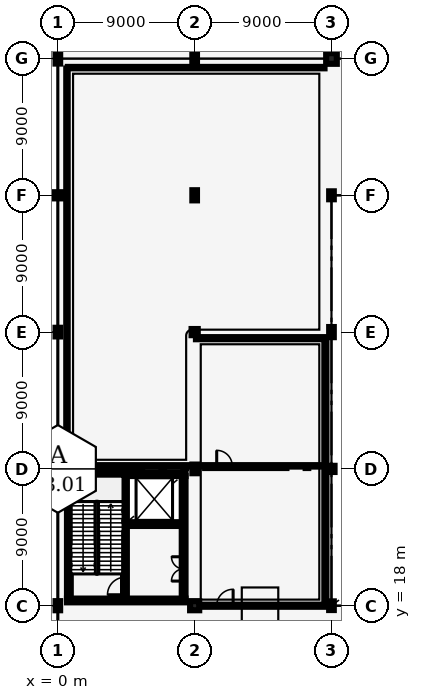
"""IFC4 building model, lengths in metres.
Left out: names, types, materials, properties, quantities, classifications, styles, units other than length and angle.
Written with IfcOpenShell. Run it as: python <this file> out.ifc"""

import sys

from ifc_helpers import new_model, si_unit, direction, frame, frame_2d, origin, origin_2d, place, context, subcontext, project, spatial, rectangle, hollow_circle, i_section, extrude, element, fill, save


model = new_model("IFC4")
c1 = context("Model", 3, precision=1e-05, world=origin(), true_north=direction((0.0, 1.0)))
c2 = subcontext(c1, "Body", "Model", "MODEL_VIEW")
j1 = project(units=[si_unit("LENGTHUNIT", "METRE"), si_unit("PLANEANGLEUNIT", "RADIAN")], contexts=[c1])
p1 = place(None, origin())
s1 = spatial("IfcSite", under=j1, at=p1, CompositionType="ELEMENT")
p2 = place(p1, origin())
s2 = spatial("IfcBuilding", under=s1, at=p2, CompositionType="ELEMENT")
p3 = place(p2, frame((0.0, 0.0, 6.0)))
s3 = spatial("IfcBuildingStorey", under=s2, at=p3, CompositionType="ELEMENT", Elevation=6.0)
p4 = place(p3, frame((0.0, 18.0, 0.0), z_axis=(0.0, 0.0, 1.0), x_axis=(1.0, 0.0, 0.0)))
e1 = element("IfcColumn", 1, at=p4, inside=s3, PredefinedType="COLUMN", context=c2, shape_type="SweptSolid", body=[
    extrude(i_section(OverallWidth=0.3, OverallDepth=0.6, WebThickness=0.015, FlangeThickness=0.03, FilletRadius=0.027, at=origin_2d()), origin(), (0.0, 0.0, 1.0), 6.0),
])
p5 = place(p3, frame((0.0, 27.0, 0.0), z_axis=(0.0, 0.0, 1.0), x_axis=(1.0, 0.0, 0.0)))
e2 = element("IfcColumn", 2, at=p5, inside=s3, PredefinedType="COLUMN", context=c2, shape_type="SweptSolid", body=[
    extrude(rectangle(XDim=0.6, YDim=0.6, at=origin_2d()), origin(), (0.0, 0.0, 1.0), 6.0),
])
p6 = place(p3, frame((0.0, 36.0, 0.0), z_axis=(0.0, 0.0, 1.0), x_axis=(1.0, 0.0, 0.0)))
e3 = element("IfcColumn", 3, at=p6, inside=s3, PredefinedType="COLUMN", context=c2, shape_type="SweptSolid", body=[
    extrude(i_section(OverallWidth=0.306, OverallDepth=0.572, WebThickness=0.021, FlangeThickness=0.04, FilletRadius=0.027, at=origin_2d()), origin(), (0.0, 0.0, 1.0), 6.0),
])
p7 = place(p3, frame((0.0, 45.0, 0.0), z_axis=(0.0, 0.0, 1.0), x_axis=(1.0, 0.0, 0.0)))
e4 = element("IfcColumn", 4, at=p7, inside=s3, PredefinedType="COLUMN", context=c2, shape_type="SweptSolid", body=[
    extrude(hollow_circle(Radius=0.203, WallThickness=0.016, at=origin_2d()), origin(), (0.0, 0.0, 1.0), 6.0),
])
p8 = place(p3, frame((0.0, 54.0, 0.0), z_axis=(0.0, 0.0, 1.0), x_axis=(1.0, 0.0, 0.0)))
e5 = element("IfcColumn", 5, at=p8, inside=s3, PredefinedType="COLUMN", context=c2, shape_type="SweptSolid", body=[
    extrude(i_section(OverallWidth=0.305, OverallDepth=0.668, WebThickness=0.021, FlangeThickness=0.04, FilletRadius=0.027, at=origin_2d()), origin(), (0.0, 0.0, 1.0), 6.0),
])
p9 = place(p3, frame((9.0, 18.0, 0.0), z_axis=(0.0, 0.0, 1.0), x_axis=(1.0, 0.0, 0.0)))
e6 = element("IfcColumn", 6, at=p9, inside=s3, PredefinedType="COLUMN", context=c2, shape_type="SweptSolid", body=[
    extrude(rectangle(XDim=0.6, YDim=0.6, at=origin_2d()), origin(), (0.0, 0.0, 1.0), 6.0),
])
p10 = place(p3, frame((9.0, 27.0, 0.0), z_axis=(0.0, 0.0, 1.0), x_axis=(1.0, 0.0, 0.0)))
e7 = element("IfcColumn", 7, at=p10, inside=s3, PredefinedType="COLUMN", context=c2, shape_type="SweptSolid", body=[
    extrude(i_section(OverallWidth=0.306, OverallDepth=0.572, WebThickness=0.021, FlangeThickness=0.04, FilletRadius=0.027, at=origin_2d()), origin(), (0.0, 0.0, 1.0), 6.0),
])
p11 = place(p3, frame((9.0, 36.0, 0.0), z_axis=(0.0, 0.0, 1.0), x_axis=(1.0, 0.0, 0.0)))
e8 = element("IfcColumn", 8, at=p11, inside=s3, PredefinedType="COLUMN", context=c2, shape_type="SweptSolid", body=[
    extrude(hollow_circle(Radius=0.203, WallThickness=0.016, at=origin_2d()), origin(), (0.0, 0.0, 1.0), 6.0),
])
p12 = place(p3, frame((9.0, 45.0, 0.0), z_axis=(0.0, 0.0, 1.0), x_axis=(1.0, 0.0, 0.0)))
e9 = element("IfcColumn", 9, at=p12, inside=s3, PredefinedType="COLUMN", context=c2, shape_type="SweptSolid", body=[
    extrude(i_section(OverallWidth=0.305, OverallDepth=0.668, WebThickness=0.021, FlangeThickness=0.04, FilletRadius=0.027, at=origin_2d()), origin(), (0.0, 0.0, 1.0), 6.0),
])
p13 = place(p3, frame((9.0, 54.0, 0.0), z_axis=(0.0, 0.0, 1.0), x_axis=(1.0, 0.0, 0.0)))
e10 = element("IfcColumn", 10, at=p13, inside=s3, PredefinedType="COLUMN", context=c2, shape_type="SweptSolid", body=[
    extrude(i_section(OverallWidth=0.306, OverallDepth=0.524, WebThickness=0.021, FlangeThickness=0.04, FilletRadius=0.027, at=origin_2d()), origin(), (0.0, 0.0, 1.0), 6.0),
])
p14 = place(p3, frame((18.0, 18.0, 0.0), z_axis=(0.0, 0.0, 1.0), x_axis=(1.0, 0.0, 0.0)))
e11 = element("IfcColumn", 11, at=p14, inside=s3, PredefinedType="COLUMN", context=c2, shape_type="SweptSolid", body=[
    extrude(i_section(OverallWidth=0.306, OverallDepth=0.572, WebThickness=0.021, FlangeThickness=0.04, FilletRadius=0.027, at=origin_2d()), origin(), (0.0, 0.0, 1.0), 6.0),
])
p15 = place(p3, frame((18.0, 27.0, 0.0), z_axis=(0.0, 0.0, 1.0), x_axis=(1.0, 0.0, 0.0)))
e12 = element("IfcColumn", 12, at=p15, inside=s3, PredefinedType="COLUMN", context=c2, shape_type="SweptSolid", body=[
    extrude(hollow_circle(Radius=0.203, WallThickness=0.016, at=origin_2d()), origin(), (0.0, 0.0, 1.0), 6.0),
])
p16 = place(p3, frame((18.0, 36.0, 0.0), z_axis=(0.0, 0.0, 1.0), x_axis=(1.0, 0.0, 0.0)))
e13 = element("IfcColumn", 13, at=p16, inside=s3, PredefinedType="COLUMN", context=c2, shape_type="SweptSolid", body=[
    extrude(i_section(OverallWidth=0.305, OverallDepth=0.668, WebThickness=0.021, FlangeThickness=0.04, FilletRadius=0.027, at=origin_2d()), origin(), (0.0, 0.0, 1.0), 6.0),
])
p17 = place(p3, frame((18.0, 45.0, 0.0), z_axis=(0.0, 0.0, 1.0), x_axis=(1.0, 0.0, 0.0)))
e14 = element("IfcColumn", 14, at=p17, inside=s3, PredefinedType="COLUMN", context=c2, shape_type="SweptSolid", body=[
    extrude(i_section(OverallWidth=0.306, OverallDepth=0.524, WebThickness=0.021, FlangeThickness=0.04, FilletRadius=0.027, at=origin_2d()), origin(), (0.0, 0.0, 1.0), 6.0),
])
p18 = place(p3, frame((18.0, 54.0, 0.0), z_axis=(0.0, 0.0, 1.0), x_axis=(1.0, 0.0, 0.0)))
e15 = element("IfcColumn", 15, at=p18, inside=s3, PredefinedType="COLUMN", context=c2, shape_type="SweptSolid", body=[
    extrude(rectangle(XDim=0.7, YDim=0.7, at=origin_2d()), origin(), (0.0, 0.0, 1.0), 6.0),
])
p19 = place(p3, frame((0.725, 18.47, 0.0), z_axis=(0.0, 0.0, 1.0), x_axis=(0.0, 1.0, 0.0)))
e16 = element("IfcWall", 16, at=p19, inside=s3, PredefinedType="SHEAR", context=c2, shape_type="SweptSolid", body=[
    extrude(rectangle(XDim=8.06, YDim=0.25, at=frame_2d((4.03, 0.0))), origin(), (0.0, 0.0, 1.0), 5.7),
])
p20 = place(p3, frame((8.275, 18.47, 0.0), z_axis=(0.0, 0.0, 1.0), x_axis=(0.0, 1.0, 0.0)))
e17 = element("IfcWall", 17, at=p20, inside=s3, PredefinedType="SHEAR", context=c2, shape_type="SweptSolid", body=[
    extrude(rectangle(XDim=8.06, YDim=0.25, at=frame_2d((4.03, 0.0))), origin(), (0.0, 0.0, 1.0), 5.7),
])
p21 = place(p20, frame((1.15, 0.0, 0.0)))
e18 = element("IfcOpeningElement", 18, at=p21, cuts=e17, PredefinedType="OPENING", context=c2, shape_type="SweptSolid", body=[
    extrude(rectangle(XDim=1.6, YDim=2.2, at=frame_2d((0.8, 1.1))), frame((0.0, 0.135, 0.0), z_axis=(0.0, -1.0, 0.0), x_axis=(1.0, 0.0, 0.0)), (0.0, 0.0, 1.0), 0.27),
])
for number, where, z_axis, x_axis in (
    (19, (0.6, 18.345, 0.0), (0.0, 0.0, 1.0), (1.0, 0.0, 0.0)),
    (20, (0.6, 26.655, 0.0), (0.0, 0.0, 1.0), (1.0, 0.0, 0.0)),
):
    element("IfcWall", number, at=place(p3, frame(where, z_axis=z_axis, x_axis=x_axis)), inside=s3, PredefinedType="SHEAR", context=c2, shape_type="SweptSolid", body=[
        extrude(rectangle(XDim=7.8, YDim=0.25, at=frame_2d((3.9, 0.0))), origin(), (0.0, 0.0, 1.0), 5.7),
    ])
p22 = place(p3, frame((4.415, 18.47, 0.0), z_axis=(0.0, 0.0, 1.0), x_axis=(0.0, 1.0, 0.0)))
e21 = element("IfcWall", 21, at=p22, inside=s3, PredefinedType="SHEAR", context=c2, shape_type="SweptSolid", body=[
    extrude(rectangle(XDim=8.06, YDim=0.25, at=frame_2d((4.03, 0.0))), origin(), (0.0, 0.0, 1.0), 5.7),
])
p23 = place(p22, frame((0.25, 0.0, 0.0)))
e22 = element("IfcOpeningElement", 22, at=p23, cuts=e21, PredefinedType="OPENING", context=c2, shape_type="SweptSolid", body=[
    extrude(rectangle(XDim=1.15, YDim=2.15, at=frame_2d((0.575, 1.075))), frame((0.0, 0.135, 0.0), z_axis=(0.0, -1.0, 0.0), x_axis=(1.0, 0.0, 0.0)), (0.0, 0.0, 1.0), 0.27),
])
p24 = place(p3, frame((4.54, 23.37, 0.0), z_axis=(0.0, 0.0, 1.0), x_axis=(1.0, 0.0, 0.0)))
e23 = element("IfcWall", 23, at=p24, inside=s3, PredefinedType="SHEAR", context=c2, shape_type="SweptSolid", body=[
    extrude(rectangle(XDim=3.61, YDim=0.25, at=frame_2d((1.805, 0.0))), origin(), (0.0, 0.0, 1.0), 5.7),
])
p25 = place(p24, frame((0.5, 0.0, 0.0)))
e24 = element("IfcOpeningElement", 24, at=p25, cuts=e23, PredefinedType="OPENING", context=c2, shape_type="SweptSolid", body=[
    extrude(rectangle(XDim=2.2, YDim=2.4, at=frame_2d((1.1, 1.2))), frame((0.0, 0.135, 0.0), z_axis=(0.0, -1.0, 0.0), x_axis=(1.0, 0.0, 0.0)), (0.0, 0.0, 1.0), 0.27),
])
p26 = place(p3, frame((9.0, 18.0, 0.0), z_axis=(0.0, 0.0, 1.0), x_axis=(1.0, 0.0, 0.0)))
e25 = element("IfcWall", 25, at=p26, inside=s3, PredefinedType="PARTITIONING", context=c2, shape_type="SweptSolid", body=[
    extrude(rectangle(XDim=8.6, YDim=0.14, at=frame_2d((4.3, 0.0))), origin(), (0.0, 0.0, 1.0), 4.85),
])
p27 = place(p26, frame((1.45, 0.0, 0.0)))
e26 = element("IfcOpeningElement", 26, at=p27, cuts=e25, PredefinedType="OPENING", context=c2, shape_type="SweptSolid", body=[
    extrude(rectangle(XDim=1.08, YDim=2.18, at=frame_2d((0.54, 1.09))), frame((0.0, 0.08, 0.0), z_axis=(0.0, -1.0, 0.0), x_axis=(1.0, 0.0, 0.0)), (0.0, 0.0, 1.0), 0.16),
])
p28 = place(p3, frame((9.084, 35.6, 0.0), z_axis=(0.0, 0.0, 1.0), x_axis=(1.0, 0.0, 0.0)))
e27 = element("IfcWall", 27, at=p28, inside=s3, PredefinedType="PARTITIONING", context=c2, shape_type="SweptSolid", body=[
    extrude(rectangle(XDim=8.432, YDim=0.14, at=frame_2d((4.216, 0.0))), origin(), (0.0, 0.0, 1.0), 4.85),
])
p29 = place(p3, frame((17.6, 18.084, 0.0), z_axis=(0.0, 0.0, 1.0), x_axis=(0.0, 1.0, 0.0)))
e28 = element("IfcWall", 28, at=p29, inside=s3, PredefinedType="PARTITIONING", context=c2, shape_type="SweptSolid", body=[
    extrude(rectangle(XDim=17.432, YDim=0.14, at=frame_2d((8.716, 0.0))), origin(), (0.0, 0.0, 1.0), 4.85),
])
p30 = place(p3, frame((0.6, 27.2, 0.0), z_axis=(0.0, 0.0, 1.0), x_axis=(1.0, 0.0, 0.0)))
e29 = element("IfcWall", 29, at=p30, inside=s3, PredefinedType="PARTITIONING", context=c2, shape_type="SweptSolid", body=[
    extrude(rectangle(XDim=17.0, YDim=0.095, at=frame_2d((8.5, 0.0))), origin(), (0.0, 0.0, 1.0), 4.85),
])
p31 = place(p30, frame((9.85, 0.0, 0.0)))
e30 = element("IfcOpeningElement", 30, at=p31, cuts=e29, PredefinedType="OPENING", context=c2, shape_type="SweptSolid", body=[
    extrude(rectangle(XDim=1.02, YDim=2.15, at=frame_2d((0.51, 1.075))), frame((0.0, 0.057, 0.0), z_axis=(0.0, -1.0, 0.0), x_axis=(1.0, 0.0, 0.0)), (0.0, 0.0, 1.0), 0.115),
])
p32 = place(p3, frame((0.657, 53.4, 0.0), z_axis=(0.0, 0.0, 1.0), x_axis=(1.0, 0.0, 0.0)))
e31 = element("IfcWall", 31, at=p32, inside=s3, PredefinedType="PARTITIONING", context=c2, shape_type="SweptSolid", body=[
    extrude(rectangle(XDim=16.886, YDim=0.095, at=frame_2d((8.443, 0.0))), origin(), (0.0, 0.0, 1.0), 4.85),
])
p33 = place(p3, frame((0.6, 27.257, 0.0), z_axis=(0.0, 0.0, 1.0), x_axis=(0.0, 1.0, 0.0)))
e32 = element("IfcWall", 32, at=p33, inside=s3, PredefinedType="PARTITIONING", context=c2, shape_type="SweptSolid", body=[
    extrude(rectangle(XDim=26.086, YDim=0.095, at=frame_2d((13.043, 0.0))), origin(), (0.0, 0.0, 1.0), 4.85),
])
p34 = place(p23, origin())
e33 = element("IfcDoor", 33, at=p34, inside=s3, OperationType="SINGLE_SWING_LEFT", PredefinedType="DOOR", context=c2, shape_type="SweptSolid", body=[
    extrude(rectangle(XDim=1.15, YDim=2.15, at=frame_2d((0.575, 1.075))), frame((0.0, 0.025, 0.0), z_axis=(0.0, -1.0, 0.0), x_axis=(1.0, 0.0, 0.0)), (0.0, 0.0, 1.0), 0.05),
])
fill(e22, e33)
p35 = place(p25, origin())
e34 = element("IfcDoor", 34, at=p35, inside=s3, OperationType="DOUBLE_DOOR_SLIDING", PredefinedType="DOOR", context=c2, shape_type="SweptSolid", body=[
    extrude(rectangle(XDim=2.2, YDim=2.4, at=frame_2d((1.1, 1.2))), frame((0.0, 0.025, 0.0), z_axis=(0.0, -1.0, 0.0), x_axis=(1.0, 0.0, 0.0)), (0.0, 0.0, 1.0), 0.05),
])
fill(e24, e34)
p36 = place(p21, origin())
e35 = element("IfcDoor", 35, at=p36, inside=s3, OperationType="DOUBLE_DOOR_SINGLE_SWING", PredefinedType="DOOR", context=c2, shape_type="SweptSolid", body=[
    extrude(rectangle(XDim=1.6, YDim=2.2, at=frame_2d((0.8, 1.1))), frame((0.0, 0.025, 0.0), z_axis=(0.0, -1.0, 0.0), x_axis=(1.0, 0.0, 0.0)), (0.0, 0.0, 1.0), 0.05),
])
fill(e18, e35)
p37 = place(p27, origin())
e36 = element("IfcDoor", 36, at=p37, inside=s3, OperationType="SINGLE_SWING_RIGHT", PredefinedType="DOOR", context=c2, shape_type="SweptSolid", body=[
    extrude(rectangle(XDim=1.08, YDim=2.18, at=frame_2d((0.54, 1.09))), frame((0.0, 0.025, 0.0), z_axis=(0.0, -1.0, 0.0), x_axis=(1.0, 0.0, 0.0)), (0.0, 0.0, 1.0), 0.05),
])
fill(e26, e36)
p38 = place(p31, origin())
e37 = element("IfcDoor", 37, at=p38, inside=s3, OperationType="SINGLE_SWING_LEFT", PredefinedType="DOOR", context=c2, shape_type="SweptSolid", body=[
    extrude(rectangle(XDim=1.02, YDim=2.15, at=frame_2d((0.51, 1.075))), frame((0.0, 0.025, 0.0), z_axis=(0.0, -1.0, 0.0), x_axis=(1.0, 0.0, 0.0)), (0.0, 0.0, 1.0), 0.05),
])
fill(e30, e37)
save(model, sys.argv[1])
